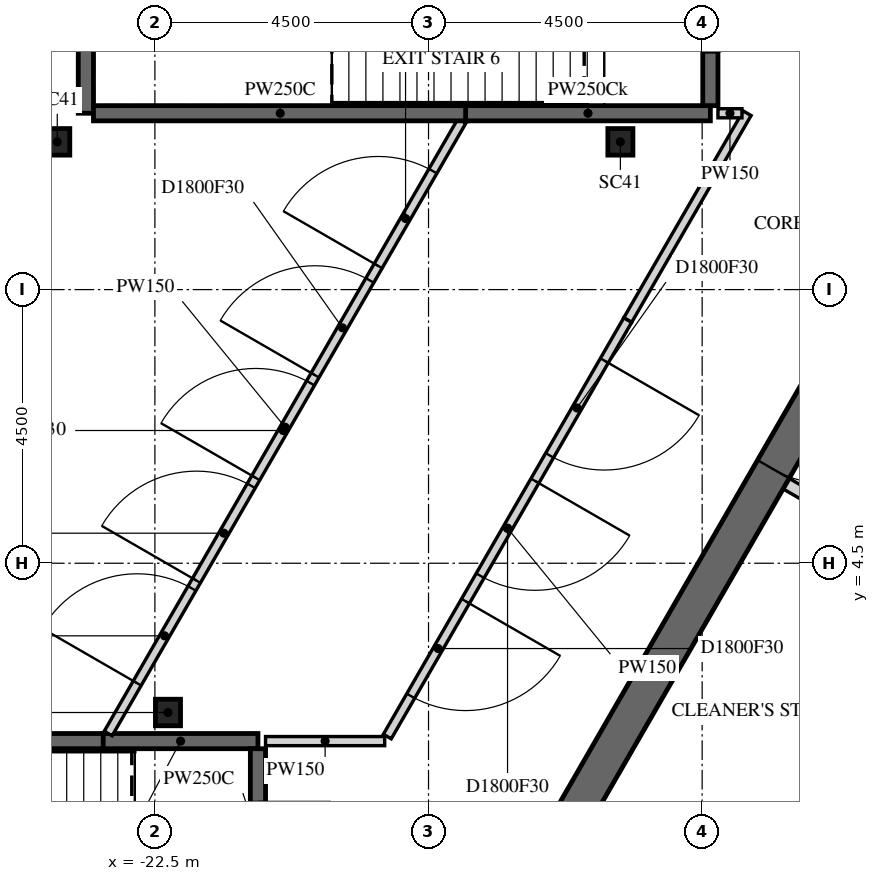
"""IFC4 building model, lengths in metres.
Left out: names, types, materials, properties, quantities, classifications, styles, units other than length and angle.
Written with IfcOpenShell. Run it as: python <this file> out.ifc"""

import sys

from ifc_helpers import new_model, si_unit, direction, frame, frame_2d, origin, origin_2d, place, context, subcontext, project, spatial, polyline, rectangle, i_section, outline, extrude, element, fill, save


model = new_model("IFC4")
c1 = context("Model", 3, precision=1e-05, world=origin(), true_north=direction((0.0, 1.0)))
c2 = subcontext(c1, "Body", "Model", "MODEL_VIEW")
j1 = project(units=[si_unit("LENGTHUNIT", "METRE"), si_unit("PLANEANGLEUNIT", "RADIAN")], contexts=[c1])
p1 = place(None, origin())
s1 = spatial("IfcSite", under=j1, at=p1, CompositionType="ELEMENT")
p2 = place(p1, origin())
s2 = spatial("IfcBuilding", under=s1, at=p2, CompositionType="ELEMENT")
p3 = place(p2, frame((0.0, 0.0, 15.0)))
s3 = spatial("IfcBuildingStorey", under=s2, at=p3, CompositionType="ELEMENT", Elevation=15.0)
for number, where, z_axis, x_axis in (
    (1, (-22.285, 2.045, -0.25), (0.0, 0.0, 1.0), (1.0, 0.0, 0.0)),
    (2, (-24.105, 11.43, -0.25), (0.0, 0.0, 1.0), (1.0, 0.0, 0.0)),
    (3, (-14.845, 11.43, -0.25), (0.0, 0.0, 1.0), (1.0, 0.0, 0.0)),
):
    element("IfcColumn", number, at=place(p3, frame(where, z_axis=z_axis, x_axis=x_axis)), inside=s3, PredefinedType="COLUMN", context=c2, shape_type="SweptSolid", body=[
        extrude(i_section(OverallWidth=0.412, OverallDepth=0.437, WebThickness=0.036, FlangeThickness=0.058, FilletRadius=0.015, at=origin_2d()), origin(), (0.0, 0.0, 1.0), 5.5),
    ])
p4 = place(p3, frame((-7.91, 13.7, -0.25), z_axis=(0.0, 0.0, 1.0), x_axis=(-0.499999880136, -0.866025472988, 0.0)))
e4 = element("IfcWall", 4, at=p4, inside=s3, PredefinedType="SHEAR", context=c2, shape_type="SweptSolid", body=[
    extrude(outline(polyline([(-0.173, -0.3), (15.993, -0.3), (15.646, 0.3), (0.173, 0.3), (-0.173, -0.3)])), origin(), (0.0, 0.0, 1.0), 5.5),
])
p5 = place(p4, frame((7.039, 0.0, 0.25)))
e5 = element("IfcOpeningElement", 5, at=p5, cuts=e4, PredefinedType="OPENING", context=c2, shape_type="SweptSolid", body=[
    extrude(rectangle(XDim=1.8, YDim=2.4, at=frame_2d((0.9, 1.2))), frame((0.0, 0.31, 0.0), z_axis=(0.0, -1.0, 0.0), x_axis=(1.0, 0.0, 0.0)), (0.0, 0.0, 1.0), 0.62),
])
p6 = place(p3, frame((-9.175, 4.109, 0.0), z_axis=(0.0, 0.0, 1.0), x_axis=(-0.865989465428, 0.500062241894, 0.0)))
e6 = element("IfcWall", 6, at=p6, inside=s3, PredefinedType="PARTITIONING", context=c2, shape_type="SweptSolid", body=[
    extrude(rectangle(XDim=3.4, YDim=0.2, at=frame_2d((1.7, 0.0))), origin(), (0.0, 0.0, 1.0), 5.25),
])
p7 = place(p6, frame((1.351, 0.0, 0.0)))
e7 = element("IfcOpeningElement", 7, at=p7, cuts=e6, PredefinedType="OPENING", context=c2, shape_type="SweptSolid", body=[
    extrude(rectangle(XDim=0.9, YDim=2.1, at=frame_2d((0.45, 1.05))), frame((0.0, 0.11, 0.0), z_axis=(0.0, -1.0, 0.0), x_axis=(1.0, 0.0, 0.0)), (0.0, 0.0, 1.0), 0.22),
])
p8 = place(p3, frame((-30.95, 1.575, 0.0), z_axis=(0.0, 0.0, 1.0), x_axis=(1.0, 0.0, 0.0)))
e8 = element("IfcWall", 8, at=p8, inside=s3, PredefinedType="PARTITIONING", context=c2, shape_type="SweptSolid", body=[
    extrude(rectangle(XDim=7.622, YDim=0.25, at=frame_2d((3.811, 0.0))), origin(), (0.0, 0.0, 1.0), 5.25),
])
p9 = place(p3, frame((-23.635, 11.9, 0.0), z_axis=(0.0, 0.0, 1.0), x_axis=(0.0, 1.0, 0.0)))
e9 = element("IfcWall", 9, at=p9, inside=s3, PredefinedType="PARTITIONING", context=c2, shape_type="SweptSolid", body=[
    extrude(rectangle(XDim=3.2, YDim=0.25, at=frame_2d((1.6, 0.0))), origin(), (0.0, 0.0, 1.0), 5.25),
])
p10 = place(p3, frame((-23.35, 1.575, 0.0), z_axis=(0.0, 0.0, 1.0), x_axis=(1.0, 0.0, 0.0)))
e10 = element("IfcWall", 10, at=p10, inside=s3, PredefinedType="PARTITIONING", context=c2, shape_type="SweptSolid", body=[
    extrude(rectangle(XDim=2.545, YDim=0.25, at=frame_2d((1.272, 0.0))), origin(), (0.0, 0.0, 1.0), 5.25),
])
p11 = place(p3, frame((-20.805, 1.45, 0.0), z_axis=(0.0, 0.0, 1.0), x_axis=(0.0, -1.0, 0.0)))
e11 = element("IfcWall", 11, at=p11, inside=s3, PredefinedType="PARTITIONING", context=c2, shape_type="SweptSolid", body=[
    extrude(rectangle(XDim=2.95, YDim=0.25, at=frame_2d((1.475, 0.0))), origin(), (0.0, 0.0, 1.0), 5.25),
])
p12 = place(p11, frame((0.875, 0.0, 0.0)))
e12 = element("IfcOpeningElement", 12, at=p12, cuts=e11, PredefinedType="OPENING", context=c2, shape_type="SweptSolid", body=[
    extrude(rectangle(XDim=1.2, YDim=2.1, at=frame_2d((0.6, 1.05))), frame((0.0, 0.135, 0.0), z_axis=(0.0, -1.0, 0.0), x_axis=(1.0, 0.0, 0.0)), (0.0, 0.0, 1.0), 0.27),
])
p13 = place(p3, frame((-20.68, 1.575, 0.0), z_axis=(0.0, 0.0, 1.0), x_axis=(1.0, 0.0, 0.0)))
e13 = element("IfcWall", 13, at=p13, inside=s3, PredefinedType="PARTITIONING", context=c2, shape_type="SweptSolid", body=[
    extrude(rectangle(XDim=1.959, YDim=0.15, at=frame_2d((0.979, 0.0))), origin(), (0.0, 0.0, 1.0), 5.25),
])
p14 = place(p3, frame((-23.268, 1.7, 0.0), z_axis=(0.0, 0.0, 1.0), x_axis=(0.500054871588, 0.86599372134, 0.0)))
e14 = element("IfcWall", 14, at=p14, inside=s3, PredefinedType="PARTITIONING", context=c2, shape_type="SweptSolid", body=[
    extrude(rectangle(XDim=11.634, YDim=0.15, at=frame_2d((5.817, 0.0))), origin(), (0.0, 0.0, 1.0), 5.25),
])
p15 = place(p14, frame((8.879, 0.0, 0.0)))
e15 = element("IfcOpeningElement", 15, at=p15, cuts=e14, PredefinedType="OPENING", context=c2, shape_type="SweptSolid", body=[
    extrude(rectangle(XDim=1.8, YDim=2.1, at=frame_2d((0.9, 1.05))), frame((0.0, 0.085, 0.0), z_axis=(0.0, -1.0, 0.0), x_axis=(1.0, 0.0, 0.0)), (0.0, 0.0, 1.0), 0.17),
])
p16 = place(p14, frame((6.804, 0.0, 0.0)))
e16 = element("IfcOpeningElement", 16, at=p16, cuts=e14, PredefinedType="OPENING", context=c2, shape_type="SweptSolid", body=[
    extrude(rectangle(XDim=1.8, YDim=2.1, at=frame_2d((0.9, 1.05))), frame((0.0, 0.085, 0.0), z_axis=(0.0, -1.0, 0.0), x_axis=(1.0, 0.0, 0.0)), (0.0, 0.0, 1.0), 0.17),
])
p17 = place(p14, frame((4.854, 0.0, 0.0)))
e17 = element("IfcOpeningElement", 17, at=p17, cuts=e14, PredefinedType="OPENING", context=c2, shape_type="SweptSolid", body=[
    extrude(rectangle(XDim=1.8, YDim=2.1, at=frame_2d((0.9, 1.05))), frame((0.0, 0.085, 0.0), z_axis=(0.0, -1.0, 0.0), x_axis=(1.0, 0.0, 0.0)), (0.0, 0.0, 1.0), 0.17),
])
p18 = place(p14, frame((2.904, 0.0, 0.0)))
e18 = element("IfcOpeningElement", 18, at=p18, cuts=e14, PredefinedType="OPENING", context=c2, shape_type="SweptSolid", body=[
    extrude(rectangle(XDim=1.8, YDim=2.1, at=frame_2d((0.9, 1.05))), frame((0.0, 0.085, 0.0), z_axis=(0.0, -1.0, 0.0), x_axis=(1.0, 0.0, 0.0)), (0.0, 0.0, 1.0), 0.17),
])
p19 = place(p14, frame((0.955, 0.0, 0.0)))
e19 = element("IfcOpeningElement", 19, at=p19, cuts=e14, PredefinedType="OPENING", context=c2, shape_type="SweptSolid", body=[
    extrude(rectangle(XDim=1.8, YDim=2.1, at=frame_2d((0.9, 1.05))), frame((0.0, 0.085, 0.0), z_axis=(0.0, -1.0, 0.0), x_axis=(1.0, 0.0, 0.0)), (0.0, 0.0, 1.0), 0.17),
])
p20 = place(p3, frame((-17.368, 11.9, 0.0), z_axis=(0.0, 0.0, 1.0), x_axis=(-1.0, 0.0, 0.0)))
e20 = element("IfcWall", 20, at=p20, inside=s3, PredefinedType="PARTITIONING", context=c2, shape_type="SweptSolid", body=[
    extrude(rectangle(XDim=6.142, YDim=0.25, at=frame_2d((3.071, 0.0))), origin(), (0.0, 0.0, 1.0), 5.25),
])
p21 = place(p3, frame((-14.723, 8.5, 0.0), z_axis=(0.0, 0.0, 1.0), x_axis=(-0.499993197506, -0.86602933117, 0.0)))
e21 = element("IfcWall", 21, at=p21, inside=s3, PredefinedType="PARTITIONING", context=c2, shape_type="SweptSolid", body=[
    extrude(rectangle(XDim=7.91, YDim=0.15, at=frame_2d((3.955, 0.0))), origin(), (0.0, 0.0, 1.0), 5.25),
])
p22 = place(p21, frame((0.771, 0.0, 0.0)))
e22 = element("IfcOpeningElement", 22, at=p22, cuts=e21, PredefinedType="OPENING", context=c2, shape_type="SweptSolid", body=[
    extrude(rectangle(XDim=1.8, YDim=2.1, at=frame_2d((0.9, 1.05))), frame((0.0, 0.085, 0.0), z_axis=(0.0, -1.0, 0.0), x_axis=(1.0, 0.0, 0.0)), (0.0, 0.0, 1.0), 0.17),
])
p23 = place(p21, frame((3.055, 0.0, 0.0)))
e23 = element("IfcOpeningElement", 23, at=p23, cuts=e21, PredefinedType="OPENING", context=c2, shape_type="SweptSolid", body=[
    extrude(rectangle(XDim=1.8, YDim=2.1, at=frame_2d((0.9, 1.05))), frame((0.0, 0.085, 0.0), z_axis=(0.0, -1.0, 0.0), x_axis=(1.0, 0.0, 0.0)), (0.0, 0.0, 1.0), 0.17),
])
p24 = place(p21, frame((5.339, 0.0, 0.0)))
e24 = element("IfcOpeningElement", 24, at=p24, cuts=e21, PredefinedType="OPENING", context=c2, shape_type="SweptSolid", body=[
    extrude(rectangle(XDim=1.8, YDim=2.1, at=frame_2d((0.9, 1.05))), frame((0.0, 0.085, 0.0), z_axis=(0.0, -1.0, 0.0), x_axis=(1.0, 0.0, 0.0)), (0.0, 0.0, 1.0), 0.17),
])
p25 = place(p3, frame((-13.365, 11.9, 0.0), z_axis=(0.0, 0.0, 1.0), x_axis=(-1.0, 0.0, 0.0)))
e25 = element("IfcWall", 25, at=p25, inside=s3, PredefinedType="PARTITIONING", context=c2, shape_type="SweptSolid", body=[
    extrude(rectangle(XDim=4.025, YDim=0.25, at=frame_2d((2.012, 0.0))), origin(), (0.0, 0.0, 1.0), 4.797),
])
p26 = place(p3, frame((-13.365, 14.975, 0.0), z_axis=(0.0, 0.0, 1.0), x_axis=(0.0, -1.0, 0.0)))
e26 = element("IfcWall", 26, at=p26, inside=s3, PredefinedType="PARTITIONING", context=c2, shape_type="SweptSolid", body=[
    extrude(rectangle(XDim=2.95, YDim=0.25, at=frame_2d((1.475, 0.0))), origin(), (0.0, 0.0, 1.0), 4.488),
])
p27 = place(p26, frame((0.875, 0.0, 0.0)))
e27 = element("IfcOpeningElement", 27, at=p27, cuts=e26, PredefinedType="OPENING", context=c2, shape_type="SweptSolid", body=[
    extrude(rectangle(XDim=1.2, YDim=2.1, at=frame_2d((0.6, 1.05))), frame((0.0, 0.135, 0.0), z_axis=(0.0, -1.0, 0.0), x_axis=(1.0, 0.0, 0.0)), (0.0, 0.0, 1.0), 0.27),
])
p28 = place(p3, frame((-12.76, 11.9, 0.0), z_axis=(0.0, 0.0, 1.0), x_axis=(-0.50009934258, -0.865968040721, 0.0)))
e28 = element("IfcWall", 28, at=p28, inside=s3, PredefinedType="PARTITIONING", context=c2, shape_type="SweptSolid", body=[
    extrude(rectangle(XDim=3.925, YDim=0.15, at=frame_2d((1.962, 0.0))), origin(), (0.0, 0.0, 1.0), 5.25),
])
p29 = place(p3, frame((-12.846, 11.9, 0.0), z_axis=(0.0, 0.0, 1.0), x_axis=(-1.0, 0.0, 0.0)))
e29 = element("IfcWall", 29, at=p29, inside=s3, PredefinedType="PARTITIONING", context=c2, shape_type="SweptSolid", body=[
    extrude(rectangle(XDim=0.394, YDim=0.15, at=frame_2d((0.197, 0.0))), origin(), (0.0, 0.0, 1.0), 5.25),
])
p30 = place(p5, origin())
e30 = element("IfcDoor", 30, at=p30, inside=s3, OperationType="DOUBLE_DOOR_SINGLE_SWING", PredefinedType="DOOR", context=c2, shape_type="SweptSolid", body=[
    extrude(rectangle(XDim=1.8, YDim=2.4, at=frame_2d((0.9, 1.2))), frame((0.0, 0.025, 0.0), z_axis=(0.0, -1.0, 0.0), x_axis=(1.0, 0.0, 0.0)), (0.0, 0.0, 1.0), 0.05),
])
fill(e5, e30)
p31 = place(p15, origin())
e31 = element("IfcDoor", 31, at=p31, inside=s3, OperationType="DOUBLE_DOOR_SINGLE_SWING", PredefinedType="DOOR", context=c2, shape_type="SweptSolid", body=[
    extrude(rectangle(XDim=1.8, YDim=2.1, at=frame_2d((0.9, 1.05))), frame((0.0, 0.025, 0.0), z_axis=(0.0, -1.0, 0.0), x_axis=(1.0, 0.0, 0.0)), (0.0, 0.0, 1.0), 0.05),
])
fill(e15, e31)
p32 = place(p16, origin())
e32 = element("IfcDoor", 32, at=p32, inside=s3, OperationType="DOUBLE_DOOR_SINGLE_SWING", PredefinedType="DOOR", context=c2, shape_type="SweptSolid", body=[
    extrude(rectangle(XDim=1.8, YDim=2.1, at=frame_2d((0.9, 1.05))), frame((0.0, 0.025, 0.0), z_axis=(0.0, -1.0, 0.0), x_axis=(1.0, 0.0, 0.0)), (0.0, 0.0, 1.0), 0.05),
])
fill(e16, e32)
p33 = place(p17, origin())
e33 = element("IfcDoor", 33, at=p33, inside=s3, OperationType="DOUBLE_DOOR_SINGLE_SWING", PredefinedType="DOOR", context=c2, shape_type="SweptSolid", body=[
    extrude(rectangle(XDim=1.8, YDim=2.1, at=frame_2d((0.9, 1.05))), frame((0.0, 0.025, 0.0), z_axis=(0.0, -1.0, 0.0), x_axis=(1.0, 0.0, 0.0)), (0.0, 0.0, 1.0), 0.05),
])
fill(e17, e33)
p34 = place(p18, origin())
e34 = element("IfcDoor", 34, at=p34, inside=s3, OperationType="DOUBLE_DOOR_SINGLE_SWING", PredefinedType="DOOR", context=c2, shape_type="SweptSolid", body=[
    extrude(rectangle(XDim=1.8, YDim=2.1, at=frame_2d((0.9, 1.05))), frame((0.0, 0.025, 0.0), z_axis=(0.0, -1.0, 0.0), x_axis=(1.0, 0.0, 0.0)), (0.0, 0.0, 1.0), 0.05),
])
fill(e18, e34)
p35 = place(p19, origin())
e35 = element("IfcDoor", 35, at=p35, inside=s3, OperationType="DOUBLE_DOOR_SINGLE_SWING", PredefinedType="DOOR", context=c2, shape_type="SweptSolid", body=[
    extrude(rectangle(XDim=1.8, YDim=2.1, at=frame_2d((0.9, 1.05))), frame((0.0, 0.025, 0.0), z_axis=(0.0, -1.0, 0.0), x_axis=(1.0, 0.0, 0.0)), (0.0, 0.0, 1.0), 0.05),
])
fill(e19, e35)
p36 = place(p22, origin())
e36 = element("IfcDoor", 36, at=p36, inside=s3, OperationType="DOUBLE_DOOR_SINGLE_SWING", PredefinedType="DOOR", context=c2, shape_type="SweptSolid", body=[
    extrude(rectangle(XDim=1.8, YDim=2.1, at=frame_2d((0.9, 1.05))), frame((0.0, 0.025, 0.0), z_axis=(0.0, -1.0, 0.0), x_axis=(1.0, 0.0, 0.0)), (0.0, 0.0, 1.0), 0.05),
])
fill(e22, e36)
p37 = place(p23, origin())
e37 = element("IfcDoor", 37, at=p37, inside=s3, OperationType="DOUBLE_DOOR_SINGLE_SWING", PredefinedType="DOOR", context=c2, shape_type="SweptSolid", body=[
    extrude(rectangle(XDim=1.8, YDim=2.1, at=frame_2d((0.9, 1.05))), frame((0.0, 0.025, 0.0), z_axis=(0.0, -1.0, 0.0), x_axis=(1.0, 0.0, 0.0)), (0.0, 0.0, 1.0), 0.05),
])
fill(e23, e37)
p38 = place(p24, origin())
e38 = element("IfcDoor", 38, at=p38, inside=s3, OperationType="DOUBLE_DOOR_SINGLE_SWING", PredefinedType="DOOR", context=c2, shape_type="SweptSolid", body=[
    extrude(rectangle(XDim=1.8, YDim=2.1, at=frame_2d((0.9, 1.05))), frame((0.0, 0.025, 0.0), z_axis=(0.0, -1.0, 0.0), x_axis=(1.0, 0.0, 0.0)), (0.0, 0.0, 1.0), 0.05),
])
fill(e24, e38)
save(model, sys.argv[1])
